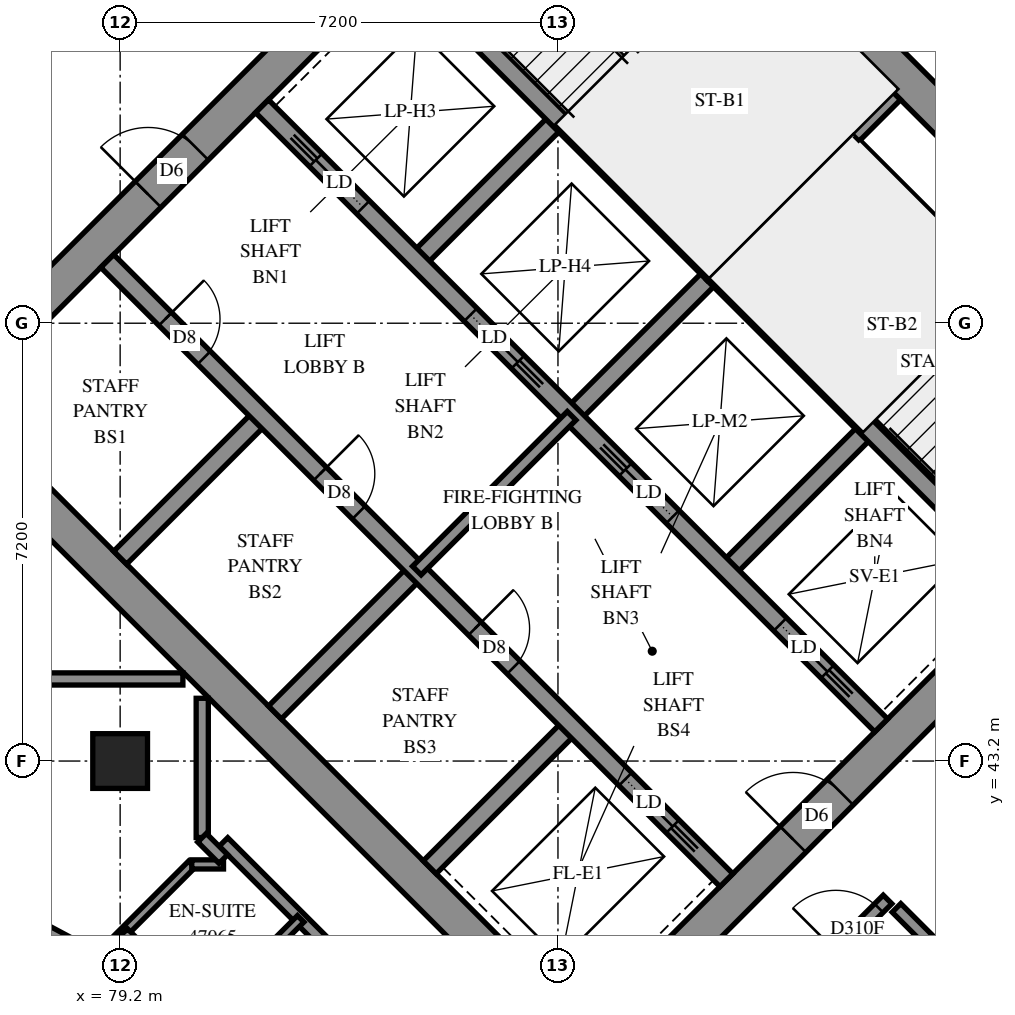
"""IFC4 building model, lengths in metres.
Left out: names, types, materials, properties, quantities, classifications, styles, units other than length and angle.
Written with IfcOpenShell. Run it as: python <this file> out.ifc"""

import sys

from ifc_helpers import new_model, si_unit, direction, frame, frame_2d, origin, origin_2d, place, context, subcontext, project, spatial, polyline, rectangle, outline, extrude, element, fill, save


model = new_model("IFC4")
c1 = context("Model", 3, precision=1e-05, world=origin(), true_north=direction((0.0, 1.0)))
c2 = subcontext(c1, "Body", "Model", "MODEL_VIEW")
j1 = project(units=[si_unit("LENGTHUNIT", "METRE"), si_unit("PLANEANGLEUNIT", "RADIAN")], contexts=[c1])
p1 = place(None, origin())
s1 = spatial("IfcSite", under=j1, at=p1, CompositionType="ELEMENT")
p2 = place(p1, origin())
s2 = spatial("IfcBuilding", under=s1, at=p2, CompositionType="ELEMENT")
p3 = place(p2, frame((0.0, 0.0, 172.8)))
s3 = spatial("IfcBuildingStorey", under=s2, at=p3, CompositionType="ELEMENT", Elevation=172.8)
p4 = place(p3, frame((79.2, 43.2, 0.0), z_axis=(0.0, 0.0, 1.0), x_axis=(1.0, 0.0, 0.0)))
e1 = element("IfcColumn", 1, at=p4, inside=s3, PredefinedType="COLUMN", context=c2, shape_type="SweptSolid", body=[
    extrude(rectangle(XDim=0.9, YDim=0.9, at=origin_2d()), origin(), (0.0, 0.0, 1.0), 3.1),
])
p5 = place(p3, frame((76.018, 49.302, -0.3), z_axis=(0.0, 0.0, 1.0), x_axis=(0.7071067812, -0.7071067812, 0.0)))
e2 = element("IfcWall", 2, at=p5, inside=s3, PredefinedType="SHEAR", context=c2, shape_type="SweptSolid", body=[
    extrude(rectangle(XDim=15.6, YDim=0.6, at=frame_2d((7.8, 0.0))), origin(), (0.0, 0.0, 1.0), 2.7),
])
p6 = place(p3, frame((86.625, 59.908, -0.3), z_axis=(0.0, 0.0, 1.0), x_axis=(0.7071067812, -0.7071067812, 0.0)))
e3 = element("IfcWall", 3, at=p6, inside=s3, PredefinedType="SHEAR", context=c2, shape_type="SweptSolid", body=[
    extrude(rectangle(XDim=15.6, YDim=0.6, at=frame_2d((7.8, 0.0))), origin(), (0.0, 0.0, 1.0), 2.7),
])
p7 = place(p6, frame((10.6, 0.0, 0.3)))
e4 = element("IfcOpeningElement", 4, at=p7, cuts=e3, PredefinedType="OPENING", context=c2, shape_type="SweptSolid", body=[
    extrude(rectangle(XDim=0.8, YDim=2.1, at=frame_2d((0.4, 1.05))), frame((0.0, 0.31, 0.0), z_axis=(0.0, -1.0, 0.0), x_axis=(1.0, 0.0, 0.0)), (0.0, 0.0, 1.0), 0.62),
])
p8 = place(p3, frame((76.442, 49.302, -0.3), z_axis=(0.0, 0.0, 1.0), x_axis=(0.7071067812, 0.7071067812, 0.0)))
e5 = element("IfcWall", 5, at=p8, inside=s3, PredefinedType="SHEAR", context=c2, shape_type="SweptSolid", body=[
    extrude(rectangle(XDim=14.4, YDim=0.6, at=frame_2d((7.2, 0.0))), origin(), (0.0, 0.0, 1.0), 2.7),
])
p9 = place(p8, frame((4.55, 0.0, 0.3)))
e6 = element("IfcOpeningElement", 6, at=p9, cuts=e5, PredefinedType="OPENING", context=c2, shape_type="SweptSolid", body=[
    extrude(rectangle(XDim=1.1, YDim=2.1, at=frame_2d((0.55, 1.05))), frame((0.0, 0.31, 0.0), z_axis=(0.0, -1.0, 0.0), x_axis=(1.0, 0.0, 0.0)), (0.0, 0.0, 1.0), 0.62),
])
p10 = place(p8, frame((11.35, 0.0, 0.3)))
e7 = element("IfcOpeningElement", 7, at=p10, cuts=e5, PredefinedType="OPENING", context=c2, shape_type="SweptSolid", body=[
    extrude(rectangle(XDim=1.1, YDim=2.1, at=frame_2d((0.55, 1.05))), frame((0.0, 0.31, 0.0), z_axis=(0.0, -1.0, 0.0), x_axis=(1.0, 0.0, 0.0)), (0.0, 0.0, 1.0), 0.62),
])
p11 = place(p3, frame((87.049, 38.695, -0.3), z_axis=(0.0, 0.0, 1.0), x_axis=(0.7071067812, 0.7071067812, 0.0)))
e8 = element("IfcWall", 8, at=p11, inside=s3, PredefinedType="SHEAR", context=c2, shape_type="SweptSolid", body=[
    extrude(rectangle(XDim=14.4, YDim=0.6, at=frame_2d((7.2, 0.0))), origin(), (0.0, 0.0, 1.0), 2.7),
])
p12 = place(p11, frame((4.55, 0.0, 0.3)))
e9 = element("IfcOpeningElement", 9, at=p12, cuts=e8, PredefinedType="OPENING", context=c2, shape_type="SweptSolid", body=[
    extrude(rectangle(XDim=1.1, YDim=2.1, at=frame_2d((0.55, 1.05))), frame((0.0, 0.31, 0.0), z_axis=(0.0, -1.0, 0.0), x_axis=(1.0, 0.0, 0.0)), (0.0, 0.0, 1.0), 0.62),
])
p13 = place(p11, frame((11.35, 0.0, 0.3)))
e10 = element("IfcOpeningElement", 10, at=p13, cuts=e8, PredefinedType="OPENING", context=c2, shape_type="SweptSolid", body=[
    extrude(rectangle(XDim=1.1, YDim=2.1, at=frame_2d((0.55, 1.05))), frame((0.0, 0.31, 0.0), z_axis=(0.0, -1.0, 0.0), x_axis=(1.0, 0.0, 0.0)), (0.0, 0.0, 1.0), 0.62),
])
for number, where, z_axis, x_axis in (
    (11, (79.2, 46.544, 0.0), (0.0, 0.0, 1.0), (0.707, 0.707, 0.0)),
    (12, (84.079, 51.423, 0.0), (0.0, 0.0, 1.0), (0.707, 0.707, 0.0)),
):
    element("IfcWall", number, at=place(p3, frame(where, z_axis=z_axis, x_axis=x_axis)), inside=s3, PredefinedType="SOLIDWALL", context=c2, shape_type="SweptSolid", body=[
        extrude(rectangle(XDim=3.3, YDim=0.3, at=frame_2d((1.65, 0.0))), origin(), (0.0, 0.0, 1.0), 3.1),
    ])
p14 = place(p3, frame((81.746, 43.999, 0.0), z_axis=(0.0, 0.0, 1.0), x_axis=(0.7071067812, 0.7071067812, 0.0)))
e13 = element("IfcWall", 13, at=p14, inside=s3, PredefinedType="SOLIDWALL", context=c2, shape_type="SweptSolid", body=[
    extrude(rectangle(XDim=3.3, YDim=0.3, at=frame_2d((1.65, 0.0))), origin(), (0.0, 0.0, 1.0), 3.1),
])
p15 = place(p3, frame((86.625, 48.878, 0.0), z_axis=(0.0, 0.0, 1.0), x_axis=(0.7071067812, 0.7071067812, 0.0)))
e14 = element("IfcWall", 14, at=p15, inside=s3, PredefinedType="SOLIDWALL", context=c2, shape_type="SweptSolid", body=[
    extrude(rectangle(XDim=3.3, YDim=0.3, at=frame_2d((1.65, 0.0))), origin(), (0.0, 0.0, 1.0), 3.1),
])
p16 = place(p3, frame((84.291, 41.453, 0.0), z_axis=(0.0, 0.0, 1.0), x_axis=(0.7071067812, 0.7071067812, 0.0)))
e15 = element("IfcWall", 15, at=p16, inside=s3, PredefinedType="SOLIDWALL", context=c2, shape_type="SweptSolid", body=[
    extrude(rectangle(XDim=3.3, YDim=0.3, at=frame_2d((1.65, 0.0))), origin(), (0.0, 0.0, 1.0), 3.1),
])
p17 = place(p3, frame((89.17, 46.332, 0.0), z_axis=(0.0, 0.0, 1.0), x_axis=(0.7071067812, 0.7071067812, 0.0)))
e16 = element("IfcWall", 16, at=p17, inside=s3, PredefinedType="SOLIDWALL", context=c2, shape_type="SweptSolid", body=[
    extrude(rectangle(XDim=3.3, YDim=0.3, at=frame_2d((1.65, 0.0))), origin(), (0.0, 0.0, 1.0), 3.1),
])
p18 = place(p3, frame((78.988, 51.423, 0.0), z_axis=(0.0, 0.0, 1.0), x_axis=(0.7071067812, -0.7071067812, 0.0)))
e17 = element("IfcWall", 17, at=p18, inside=s3, PredefinedType="SOLIDWALL", context=c2, shape_type="SweptSolid", body=[
    extrude(rectangle(XDim=14.4, YDim=0.3, at=frame_2d((7.2, 0.0))), origin(), (0.0, 0.0, 1.0), 3.1),
])
p19 = place(p18, frame((1.35, 0.0, 0.0)))
e18 = element("IfcOpeningElement", 18, at=p19, cuts=e17, PredefinedType="OPENING", context=c2, shape_type="SweptSolid", body=[
    extrude(rectangle(XDim=0.9, YDim=2.1, at=frame_2d((0.45, 1.05))), frame((0.0, 0.16, 0.0), z_axis=(0.0, -1.0, 0.0), x_axis=(1.0, 0.0, 0.0)), (0.0, 0.0, 1.0), 0.32),
])
p20 = place(p18, frame((4.95, 0.0, 0.0)))
e19 = element("IfcOpeningElement", 19, at=p20, cuts=e17, PredefinedType="OPENING", context=c2, shape_type="SweptSolid", body=[
    extrude(rectangle(XDim=0.9, YDim=2.1, at=frame_2d((0.45, 1.05))), frame((0.0, 0.16, 0.0), z_axis=(0.0, -1.0, 0.0), x_axis=(1.0, 0.0, 0.0)), (0.0, 0.0, 1.0), 0.32),
])
p21 = place(p18, frame((8.55, 0.0, 0.0)))
e20 = element("IfcOpeningElement", 20, at=p21, cuts=e17, PredefinedType="OPENING", context=c2, shape_type="SweptSolid", body=[
    extrude(rectangle(XDim=0.9, YDim=2.1, at=frame_2d((0.45, 1.05))), frame((0.0, 0.16, 0.0), z_axis=(0.0, -1.0, 0.0), x_axis=(1.0, 0.0, 0.0)), (0.0, 0.0, 1.0), 0.32),
])
p22 = place(p18, frame((12.05, 0.0, 0.0)))
e21 = element("IfcOpeningElement", 21, at=p22, cuts=e17, PredefinedType="OPENING", context=c2, shape_type="SweptSolid", body=[
    extrude(rectangle(XDim=1.1, YDim=2.1, at=frame_2d((0.55, 1.05))), frame((0.0, 0.16, 0.0), z_axis=(0.0, -1.0, 0.0), x_axis=(1.0, 0.0, 0.0)), (0.0, 0.0, 1.0), 0.32),
])
p23 = place(p3, frame((81.534, 53.969, 0.0), z_axis=(0.0, 0.0, 1.0), x_axis=(0.707103309, -0.7071102534, 0.0)))
e22 = element("IfcWall", 22, at=p23, inside=s3, PredefinedType="SOLIDWALL", context=c2, shape_type="SweptSolid", body=[
    extrude(rectangle(XDim=14.4, YDim=0.3, at=frame_2d((7.2, 0.0))), origin(), (0.0, 0.0, 1.0), 3.1),
])
p24 = place(p23, frame((1.25, 0.0, 0.0)))
e23 = element("IfcOpeningElement", 23, at=p24, cuts=e22, PredefinedType="OPENING", context=c2, shape_type="SweptSolid", body=[
    extrude(rectangle(XDim=1.1, YDim=2.1, at=frame_2d((0.55, 1.05))), frame((0.0, 0.16, 0.0), z_axis=(0.0, -1.0, 0.0), x_axis=(1.0, 0.0, 0.0)), (0.0, 0.0, 1.0), 0.32),
])
p25 = place(p23, frame((4.85, 0.0, 0.0)))
e24 = element("IfcOpeningElement", 24, at=p25, cuts=e22, PredefinedType="OPENING", context=c2, shape_type="SweptSolid", body=[
    extrude(rectangle(XDim=1.1, YDim=2.1, at=frame_2d((0.55, 1.05))), frame((0.0, 0.16, 0.0), z_axis=(0.0, -1.0, 0.0), x_axis=(1.0, 0.0, 0.0)), (0.0, 0.0, 1.0), 0.32),
])
p26 = place(p23, frame((8.45, 0.0, 0.0)))
e25 = element("IfcOpeningElement", 25, at=p26, cuts=e22, PredefinedType="OPENING", context=c2, shape_type="SweptSolid", body=[
    extrude(rectangle(XDim=1.1, YDim=2.1, at=frame_2d((0.55, 1.05))), frame((0.0, 0.16, 0.0), z_axis=(0.0, -1.0, 0.0), x_axis=(1.0, 0.0, 0.0)), (0.0, 0.0, 1.0), 0.32),
])
p27 = place(p23, frame((12.05, 0.0, 0.0)))
e26 = element("IfcOpeningElement", 26, at=p27, cuts=e22, PredefinedType="OPENING", context=c2, shape_type="SweptSolid", body=[
    extrude(rectangle(XDim=1.1, YDim=2.1, at=frame_2d((0.55, 1.05))), frame((0.0, 0.16, 0.0), z_axis=(0.0, -1.0, 0.0), x_axis=(1.0, 0.0, 0.0)), (0.0, 0.0, 1.0), 0.32),
])
for number, where, z_axis, x_axis in (
    (27, (83.867, 56.302, 0.0), (0.0, 0.0, 1.0), (0.707, -0.707, 0.0)),
    (28, (88.958, 51.211, 0.0), (0.0, 0.0, 1.0), (0.707, -0.707, 0.0)),
):
    element("IfcWall", number, at=place(p3, frame(where, z_axis=z_axis, x_axis=x_axis)), inside=s3, PredefinedType="SOLIDWALL", context=c2, shape_type="SweptSolid", body=[
        extrude(rectangle(XDim=7.2, YDim=0.3, at=frame_2d((3.6, 0.0))), origin(), (0.0, 0.0, 1.0), 3.1),
    ])
p28 = place(p3, frame((88.958, 51.211, 0.0), z_axis=(0.0, 0.0, 1.0), x_axis=(0.7071067812, 0.7071067812, 0.0)))
e29 = element("IfcWall", 29, at=p28, inside=s3, PredefinedType="SOLIDWALL", context=c2, shape_type="SweptSolid", body=[
    extrude(rectangle(XDim=4.2, YDim=0.3, at=frame_2d((2.1, 0.0))), origin(), (0.0, 0.0, 1.0), 3.1),
])
p29 = place(p3, frame((76.551, 40.996, 0.0), z_axis=(0.0, 0.0, 1.0), x_axis=(0.8822905093, -0.4707052763, 0.0)))
e30 = element("IfcWall", 30, at=p29, inside=s3, PredefinedType="SOLIDWALL", context=c2, shape_type="SweptSolid", body=[
    extrude(outline(polyline([(0.018, -0.25), (4.244, -0.25), (4.359, 0.25), (-0.018, 0.25), (0.018, -0.25)])), origin(), (0.0, 0.0, 1.0), 3.1),
])
p30 = place(p29, frame((0.31, 0.0, 0.45)))
e31 = element("IfcOpeningElement", 31, at=p30, cuts=e30, PredefinedType="OPENING", context=c2, shape_type="SweptSolid", body=[
    extrude(rectangle(XDim=1.2, YDim=2.5, at=frame_2d((0.6, 1.25))), frame((0.0, 0.26, 0.0), z_axis=(0.0, -1.0, 0.0), x_axis=(1.0, 0.0, 0.0)), (0.0, 0.0, 1.0), 0.52),
])
p31 = place(p29, frame((2.661, 0.0, 0.45)))
e32 = element("IfcOpeningElement", 32, at=p31, cuts=e30, PredefinedType="OPENING", context=c2, shape_type="SweptSolid", body=[
    extrude(rectangle(XDim=1.2, YDim=2.5, at=frame_2d((0.6, 1.25))), frame((0.0, 0.26, 0.0), z_axis=(0.0, -1.0, 0.0), x_axis=(1.0, 0.0, 0.0)), (0.0, 0.0, 1.0), 0.52),
])
p32 = place(p3, frame((91.313, 53.354, 0.0), z_axis=(0.0, 0.0, 1.0), x_axis=(0.7071140275, -0.7070995348, 0.0)))
e33 = element("IfcWall", 33, at=p32, inside=s3, PredefinedType="PARTITIONING", context=c2, shape_type="SweptSolid", body=[
    extrude(rectangle(XDim=6.9, YDim=0.15, at=frame_2d((3.45, 0.0))), origin(), (0.0, 0.0, 1.0), 3.1),
])
p33 = place(p3, frame((84.079, 46.332, 0.0), z_axis=(0.0, 0.0, 1.0), x_axis=(0.7071067812, 0.7071067812, 0.0)))
e34 = element("IfcWall", 34, at=p33, inside=s3, PredefinedType="PARTITIONING", context=c2, shape_type="SweptSolid", body=[
    extrude(rectangle(XDim=3.6, YDim=0.2, at=frame_2d((1.8, 0.0))), origin(), (0.0, 0.0, 1.0), 3.1),
])
p34 = place(p3, frame((91.967, 40.785, 0.0), z_axis=(0.0, 0.0, 1.0), x_axis=(0.7071067812, -0.7071067812, 0.0)))
e35 = element("IfcWall", 35, at=p34, inside=s3, PredefinedType="PARTITIONING", context=c2, shape_type="SweptSolid", body=[
    extrude(rectangle(XDim=12.1, YDim=0.2, at=frame_2d((6.05, 0.0))), origin(), (0.0, 0.0, 1.0), 3.1),
])
p35 = place(p34, frame((3.448, 0.0, 0.0)))
e36 = element("IfcOpeningElement", 36, at=p35, cuts=e35, PredefinedType="OPENING", context=c2, shape_type="SweptSolid", body=[
    extrude(rectangle(XDim=0.9, YDim=2.1, at=frame_2d((0.45, 1.05))), frame((0.0, 0.11, 0.0), z_axis=(0.0, -1.0, 0.0), x_axis=(1.0, 0.0, 0.0)), (0.0, 0.0, 1.0), 0.22),
])
p36 = place(p34, frame((8.457, 0.0, 0.0)))
e37 = element("IfcOpeningElement", 37, at=p36, cuts=e35, PredefinedType="OPENING", context=c2, shape_type="SweptSolid", body=[
    extrude(rectangle(XDim=1.0, YDim=2.1, at=frame_2d((0.5, 1.05))), frame((0.0, 0.11, 0.0), z_axis=(0.0, -1.0, 0.0), x_axis=(1.0, 0.0, 0.0)), (0.0, 0.0, 1.0), 0.22),
])
p37 = place(p3, frame((91.755, 57.317, 0.0), z_axis=(0.0, 0.0, 1.0), x_axis=(0.7071067812, -0.7071067812, 0.0)))
e38 = element("IfcWall", 38, at=p37, inside=s3, PredefinedType="PARTITIONING", context=c2, shape_type="SweptSolid", body=[
    extrude(rectangle(XDim=11.639, YDim=0.2, at=frame_2d((5.819, 0.0))), origin(), (0.0, 0.0, 1.0), 3.1),
])
p38 = place(p3, frame((80.899, 41.869, 0.0), z_axis=(0.0, 0.0, 1.0), x_axis=(0.7071067812, -0.7071067812, 0.0)))
e39 = element("IfcWall", 39, at=p38, inside=s3, PredefinedType="PARTITIONING", context=c2, shape_type="SweptSolid", body=[
    extrude(rectangle(XDim=8.392, YDim=0.2, at=frame_2d((4.196, 0.0))), origin(), (0.0, 0.0, 1.0), 3.1),
])
p39 = place(p38, frame((4.979, 0.0, 0.0)))
e40 = element("IfcOpeningElement", 40, at=p39, cuts=e39, PredefinedType="OPENING", context=c2, shape_type="SweptSolid", body=[
    extrude(rectangle(XDim=0.9, YDim=2.1, at=frame_2d((0.45, 1.05))), frame((0.0, 0.11, 0.0), z_axis=(0.0, -1.0, 0.0), x_axis=(1.0, 0.0, 0.0)), (0.0, 0.0, 1.0), 0.22),
])
p40 = place(p3, frame((86.834, 35.94, 0.0), z_axis=(0.0, 0.0, 1.0), x_axis=(0.7072486139, 0.7069649201, 0.0)))
e41 = element("IfcWall", 41, at=p40, inside=s3, PredefinedType="PARTITIONING", context=c2, shape_type="SweptSolid", body=[
    extrude(rectangle(XDim=7.05, YDim=0.2, at=frame_2d((3.525, 0.0))), origin(), (0.0, 0.0, 1.0), 3.1),
])
p41 = place(p40, frame((5.848, 0.0, 0.0)))
e42 = element("IfcOpeningElement", 42, at=p41, cuts=e41, PredefinedType="OPENING", context=c2, shape_type="SweptSolid", body=[
    extrude(rectangle(XDim=1.0, YDim=2.1, at=frame_2d((0.5, 1.05))), frame((0.0, 0.11, 0.0), z_axis=(0.0, -1.0, 0.0), x_axis=(1.0, 0.0, 0.0)), (0.0, 0.0, 1.0), 0.22),
])
for number, where, z_axis, x_axis in (
    (43, (77.942, 44.55, 0.0), (0.0, 0.0, 1.0), (1.0, 0.0, 0.0)),
    (44, (80.55, 41.942, 0.0), (0.0, 0.0, 1.0), (0.0, 1.0, 0.0)),
):
    element("IfcWall", number, at=place(p3, frame(where, z_axis=z_axis, x_axis=x_axis)), inside=s3, PredefinedType="PARTITIONING", context=c2, shape_type="SweptSolid", body=[
        extrude(rectangle(XDim=2.29, YDim=0.2, at=frame_2d((1.145, 0.0))), origin(), (0.0, 0.0, 1.0), 3.1),
    ])
p42 = place(p3, frame((80.605, 39.041, 0.0), z_axis=(0.0, 0.0, 1.0), x_axis=(0.7071293873, 0.7070841744, 0.0)))
e45 = element("IfcWall", 45, at=p42, inside=s3, PredefinedType="PARTITIONING", context=c2, shape_type="SweptSolid", body=[
    extrude(rectangle(XDim=2.212, YDim=0.15, at=frame_2d((1.106, 0.0))), origin(), (0.0, 0.0, 1.0), 3.1),
])
p43 = place(p42, frame((0.175, 0.0, 0.0)))
e46 = element("IfcOpeningElement", 46, at=p43, cuts=e45, PredefinedType="OPENING", context=c2, shape_type="SweptSolid", body=[
    extrude(rectangle(XDim=0.8, YDim=2.1, at=frame_2d((0.4, 1.05))), frame((0.0, 0.085, 0.0), z_axis=(0.0, -1.0, 0.0), x_axis=(1.0, 0.0, 0.0)), (0.0, 0.0, 1.0), 0.17),
])
p44 = place(p3, frame((78.902, 40.025, 0.0), z_axis=(0.0, 0.0, 1.0), x_axis=(0.7071307448, 0.7070828167, 0.0)))
e47 = element("IfcWall", 47, at=p44, inside=s3, PredefinedType="PARTITIONING", context=c2, shape_type="SweptSolid", body=[
    extrude(rectangle(XDim=2.087, YDim=0.15, at=frame_2d((1.043, 0.0))), origin(), (0.0, 0.0, 1.0), 3.1),
])
p45 = place(p3, frame((79.267, 40.389, 0.0), z_axis=(0.0, 0.0, 1.0), x_axis=(0.7071067812, -0.7071067812, 0.0)))
e48 = element("IfcWall", 48, at=p45, inside=s3, PredefinedType="PARTITIONING", context=c2, shape_type="SweptSolid", body=[
    extrude(rectangle(XDim=1.644, YDim=0.15, at=frame_2d((0.822, 0.0))), origin(), (0.0, 0.0, 1.0), 3.1),
])
p46 = place(p3, frame((80.378, 41.5, 0.0), z_axis=(0.0, 0.0, 1.0), x_axis=(1.0, 0.0, 0.0)))
e49 = element("IfcWall", 49, at=p46, inside=s3, PredefinedType="PARTITIONING", context=c2, shape_type="SweptSolid", body=[
    extrude(rectangle(XDim=0.522, YDim=0.15, at=frame_2d((0.261, 0.0))), origin(), (0.0, 0.0, 1.0), 3.1),
])
p47 = place(p3, frame((80.546, 41.938, 0.0), z_axis=(0.0, 0.0, 1.0), x_axis=(0.7071067812, -0.7071067812, 0.0)))
e50 = element("IfcWall", 50, at=p47, inside=s3, PredefinedType="PARTITIONING", context=c2, shape_type="SweptSolid", body=[
    extrude(rectangle(XDim=0.495, YDim=0.2, at=frame_2d((0.247, 0.0))), origin(), (0.0, 0.0, 1.0), 3.1),
])
p48 = place(p9, origin())
e51 = element("IfcDoor", 51, at=p48, inside=s3, OperationType="DOUBLE_DOOR_SINGLE_SWING", PredefinedType="DOOR", context=c2, shape_type="SweptSolid", body=[
    extrude(rectangle(XDim=1.1, YDim=2.1, at=frame_2d((0.55, 1.05))), frame((0.0, 0.025, 0.0), z_axis=(0.0, -1.0, 0.0), x_axis=(1.0, 0.0, 0.0)), (0.0, 0.0, 1.0), 0.05),
])
fill(e6, e51)
p49 = place(p12, origin())
e52 = element("IfcDoor", 52, at=p49, inside=s3, OperationType="DOUBLE_DOOR_SINGLE_SWING", PredefinedType="DOOR", context=c2, shape_type="SweptSolid", body=[
    extrude(rectangle(XDim=1.1, YDim=2.1, at=frame_2d((0.55, 1.05))), frame((0.0, 0.025, 0.0), z_axis=(0.0, -1.0, 0.0), x_axis=(1.0, 0.0, 0.0)), (0.0, 0.0, 1.0), 0.05),
])
fill(e9, e52)
p50 = place(p19, origin())
e53 = element("IfcDoor", 53, at=p50, inside=s3, OperationType="SINGLE_SWING_LEFT", PredefinedType="DOOR", context=c2, shape_type="SweptSolid", body=[
    extrude(rectangle(XDim=0.9, YDim=2.1, at=frame_2d((0.45, 1.05))), frame((0.0, 0.025, 0.0), z_axis=(0.0, -1.0, 0.0), x_axis=(1.0, 0.0, 0.0)), (0.0, 0.0, 1.0), 0.05),
])
fill(e18, e53)
p51 = place(p20, origin())
e54 = element("IfcDoor", 54, at=p51, inside=s3, OperationType="SINGLE_SWING_LEFT", PredefinedType="DOOR", context=c2, shape_type="SweptSolid", body=[
    extrude(rectangle(XDim=0.9, YDim=2.1, at=frame_2d((0.45, 1.05))), frame((0.0, 0.025, 0.0), z_axis=(0.0, -1.0, 0.0), x_axis=(1.0, 0.0, 0.0)), (0.0, 0.0, 1.0), 0.05),
])
fill(e19, e54)
p52 = place(p21, origin())
e55 = element("IfcDoor", 55, at=p52, inside=s3, OperationType="SINGLE_SWING_LEFT", PredefinedType="DOOR", context=c2, shape_type="SweptSolid", body=[
    extrude(rectangle(XDim=0.9, YDim=2.1, at=frame_2d((0.45, 1.05))), frame((0.0, 0.025, 0.0), z_axis=(0.0, -1.0, 0.0), x_axis=(1.0, 0.0, 0.0)), (0.0, 0.0, 1.0), 0.05),
])
fill(e20, e55)
p53 = place(p22, origin())
e56 = element("IfcDoor", 56, at=p53, inside=s3, OperationType="SLIDING_TO_RIGHT", PredefinedType="DOOR", context=c2, shape_type="SweptSolid", body=[
    extrude(rectangle(XDim=1.1, YDim=2.1, at=frame_2d((0.55, 1.05))), frame((0.0, 0.025, 0.0), z_axis=(0.0, -1.0, 0.0), x_axis=(1.0, 0.0, 0.0)), (0.0, 0.0, 1.0), 0.05),
])
fill(e21, e56)
p54 = place(p24, origin())
e57 = element("IfcDoor", 57, at=p54, inside=s3, OperationType="SLIDING_TO_LEFT", PredefinedType="DOOR", context=c2, shape_type="SweptSolid", body=[
    extrude(rectangle(XDim=1.1, YDim=2.1, at=frame_2d((0.55, 1.05))), frame((0.0, 0.025, 0.0), z_axis=(0.0, -1.0, 0.0), x_axis=(1.0, 0.0, 0.0)), (0.0, 0.0, 1.0), 0.05),
])
fill(e23, e57)
p55 = place(p25, origin())
e58 = element("IfcDoor", 58, at=p55, inside=s3, OperationType="SLIDING_TO_RIGHT", PredefinedType="DOOR", context=c2, shape_type="SweptSolid", body=[
    extrude(rectangle(XDim=1.1, YDim=2.1, at=frame_2d((0.55, 1.05))), frame((0.0, 0.025, 0.0), z_axis=(0.0, -1.0, 0.0), x_axis=(1.0, 0.0, 0.0)), (0.0, 0.0, 1.0), 0.05),
])
fill(e24, e58)
p56 = place(p26, origin())
e59 = element("IfcDoor", 59, at=p56, inside=s3, OperationType="SLIDING_TO_LEFT", PredefinedType="DOOR", context=c2, shape_type="SweptSolid", body=[
    extrude(rectangle(XDim=1.1, YDim=2.1, at=frame_2d((0.55, 1.05))), frame((0.0, 0.025, 0.0), z_axis=(0.0, -1.0, 0.0), x_axis=(1.0, 0.0, 0.0)), (0.0, 0.0, 1.0), 0.05),
])
fill(e25, e59)
p57 = place(p27, origin())
e60 = element("IfcDoor", 60, at=p57, inside=s3, OperationType="SLIDING_TO_RIGHT", PredefinedType="DOOR", context=c2, shape_type="SweptSolid", body=[
    extrude(rectangle(XDim=1.1, YDim=2.1, at=frame_2d((0.55, 1.05))), frame((0.0, 0.025, 0.0), z_axis=(0.0, -1.0, 0.0), x_axis=(1.0, 0.0, 0.0)), (0.0, 0.0, 1.0), 0.05),
])
fill(e26, e60)
p58 = place(p41, origin())
e61 = element("IfcDoor", 61, at=p58, inside=s3, OperationType="SINGLE_SWING_RIGHT", PredefinedType="DOOR", context=c2, shape_type="SweptSolid", body=[
    extrude(rectangle(XDim=1.0, YDim=2.1, at=frame_2d((0.5, 1.05))), frame((0.0, 0.025, 0.0), z_axis=(0.0, -1.0, 0.0), x_axis=(1.0, 0.0, 0.0)), (0.0, 0.0, 1.0), 0.05),
])
fill(e42, e61)
save(model, sys.argv[1])
